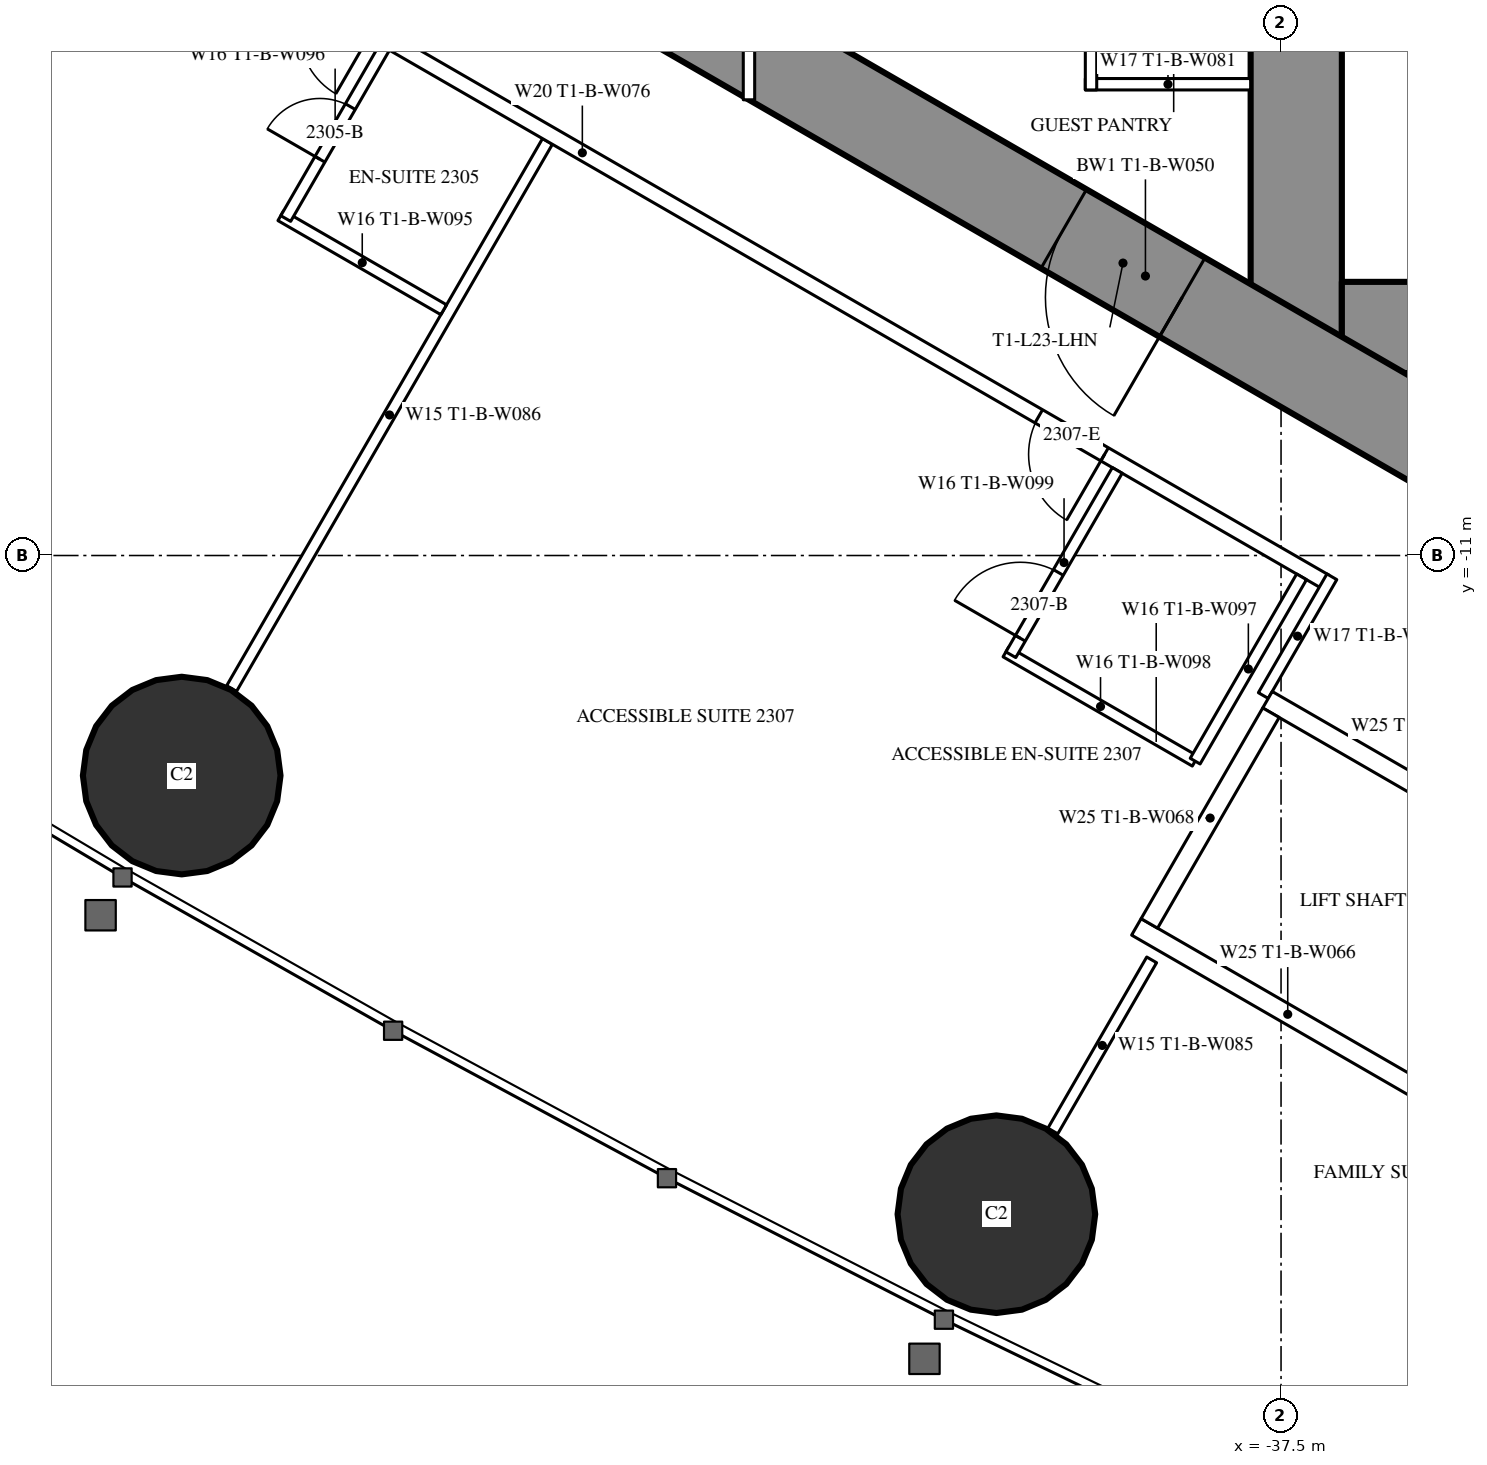
"""IFC4 building model, lengths in metres.
Left out: names, types, materials, properties, quantities, classifications, styles, units other than length and angle.
Written with IfcOpenShell. Run it as: python <this file> out.ifc"""

import sys

from ifc_helpers import new_model, si_unit, direction, frame, frame_2d, origin, origin_2d, place, context, subcontext, project, spatial, rectangle, hollow_circle, extrude, element, fill, save


model = new_model("IFC4")
c1 = context("Model", 3, precision=1e-05, world=origin(), true_north=direction((0.0, 1.0)))
c2 = subcontext(c1, "Body", "Model", "MODEL_VIEW")
j1 = project(units=[si_unit("LENGTHUNIT", "METRE"), si_unit("PLANEANGLEUNIT", "RADIAN")], contexts=[c1])
p1 = place(None, origin())
s1 = spatial("IfcSite", under=j1, at=p1, CompositionType="ELEMENT")
p2 = place(p1, origin())
s2 = spatial("IfcBuilding", under=s1, at=p2, CompositionType="ELEMENT")
p3 = place(p2, frame((0.0, 0.0, 90.6)))
s3 = spatial("IfcBuildingStorey", under=s2, at=p3, CompositionType="ELEMENT", Elevation=90.6)
for number, where, z_axis, x_axis in (
    (1, (-51.963, -13.895, 0.0), (0.0, 0.0, 1.0), (1.0, 0.0, 0.0)),
    (2, (-41.245, -19.666, 0.0), (0.0, 0.0, 1.0), (1.0, 0.0, 0.0)),
):
    element("IfcColumn", number, at=place(p3, frame(where, z_axis=z_axis, x_axis=x_axis)), inside=s3, PredefinedType="COLUMN", context=c2, shape_type="SweptSolid", body=[
        extrude(hollow_circle(Radius=1.3, WallThickness=0.1, at=origin_2d()), origin(), (0.0, 0.0, 1.0), 3.5),
    ])
p4 = place(p3, frame((-37.3, 8.6, 0.0), z_axis=(0.0, 0.0, 1.0), x_axis=(0.0, -1.0, 0.0)))
e3 = element("IfcWall", 3, at=p4, inside=s3, PredefinedType="SHEAR", context=c2, shape_type="SweptSolid", body=[
    extrude(rectangle(XDim=17.2, YDim=1.2, at=frame_2d((8.6, 0.0))), origin(), (0.0, 0.0, 1.0), 3.5),
])
p5 = place(p4, frame((7.7, 0.0, 0.0)))
e4 = element("IfcOpeningElement", 4, at=p5, cuts=e3, PredefinedType="OPENING", context=c2, shape_type="SweptSolid", body=[
    extrude(rectangle(XDim=1.8, YDim=2.2, at=frame_2d((0.9, 1.1))), frame((0.0, 0.61, 0.0), z_axis=(0.0, -1.0, 0.0), x_axis=(1.0, 0.0, 0.0)), (0.0, 0.0, 1.0), 1.22),
])
p6 = place(p3, frame((-28.3, -8.0, 0.0), z_axis=(0.0, 0.0, 1.0), x_axis=(-1.0, 0.0, 0.0)))
e5 = element("IfcWall", 5, at=p6, inside=s3, PredefinedType="SHEAR", context=c2, shape_type="SweptSolid", body=[
    extrude(rectangle(XDim=8.4, YDim=1.2, at=frame_2d((4.2, 0.0))), origin(), (0.0, 0.0, 1.0), 3.5),
])
p7 = place(p6, frame((0.25, 0.0, 0.0)))
e6 = element("IfcOpeningElement", 6, at=p7, cuts=e5, PredefinedType="OPENING", context=c2, shape_type="SweptSolid", body=[
    extrude(rectangle(XDim=1.0, YDim=2.2, at=frame_2d((0.5, 1.1))), frame((0.0, 0.61, 0.0), z_axis=(0.0, -1.0, 0.0), x_axis=(1.0, 0.0, 0.0)), (0.0, 0.0, 1.0), 1.22),
])
p8 = place(p3, frame((-27.2, -14.3, 0.0), z_axis=(0.0, 0.0, 1.0), x_axis=(-0.866024021859, 0.500002393557, 0.0)))
e7 = element("IfcWall", 7, at=p8, inside=s3, PredefinedType="SHEAR", context=c2, shape_type="SweptSolid", body=[
    extrude(rectangle(XDim=27.907, YDim=1.2, at=frame_2d((13.954, 0.0))), origin(), (0.0, 0.0, 1.0), 3.5),
])
p9 = place(p8, frame((4.6, 0.0, 0.0)))
e8 = element("IfcOpeningElement", 8, at=p9, cuts=e7, PredefinedType="OPENING", context=c2, shape_type="SweptSolid", body=[
    extrude(rectangle(XDim=1.0, YDim=2.2, at=frame_2d((0.5, 1.1))), frame((0.0, 0.61, 0.0), z_axis=(0.0, -1.0, 0.0), x_axis=(1.0, 0.0, 0.0)), (0.0, 0.0, 1.0), 1.22),
])
p10 = place(p8, frame((13.395, 0.0, 0.0)))
e9 = element("IfcOpeningElement", 9, at=p10, cuts=e7, PredefinedType="OPENING", context=c2, shape_type="SweptSolid", body=[
    extrude(rectangle(XDim=1.8, YDim=2.2, at=frame_2d((0.9, 1.1))), frame((0.0, 0.61, 0.0), z_axis=(0.0, -1.0, 0.0), x_axis=(1.0, 0.0, 0.0)), (0.0, 0.0, 1.0), 1.22),
])
p11 = place(p3, frame((-47.151, -5.552, 0.0), z_axis=(0.0, 0.0, 1.0), x_axis=(-0.500003012045, -0.866023664773, 0.0)))
e10 = element("IfcWall", 10, at=p11, inside=s3, PredefinedType="PARTITIONING", context=c2, shape_type="SweptSolid", body=[
    extrude(rectangle(XDim=8.311, YDim=0.15, at=frame_2d((4.156, 0.0))), origin(), (0.0, 0.0, 1.0), 2.2),
])
p12 = place(p3, frame((-39.202, -16.32, 0.0), z_axis=(0.0, 0.0, 1.0), x_axis=(-0.49997716683, -0.86603858612, 0.0)))
e11 = element("IfcWall", 11, at=p12, inside=s3, PredefinedType="PARTITIONING", context=c2, shape_type="SweptSolid", body=[
    extrude(rectangle(XDim=2.6, YDim=0.15, at=frame_2d((1.3, 0.0))), origin(), (0.0, 0.0, 1.0), 3.25),
])
p13 = place(p3, frame((-36.92, -11.344, 0.0), z_axis=(0.0, 0.0, 1.0), x_axis=(-0.866028313256, 0.499994960614, 0.0)))
e12 = element("IfcWall", 12, at=p13, inside=s3, PredefinedType="PARTITIONING", context=c2, shape_type="SweptSolid", body=[
    extrude(rectangle(XDim=22.568, YDim=0.2, at=frame_2d((11.284, 0.0))), origin(), (0.0, 0.0, 1.0), 3.25),
])
p14 = place(p13, frame((14.481, 0.0, 0.0)))
e13 = element("IfcOpeningElement", 13, at=p14, cuts=e12, PredefinedType="OPENING", context=c2, shape_type="SweptSolid", body=[
    extrude(rectangle(XDim=0.95, YDim=2.2, at=frame_2d((0.475, 1.1))), frame((0.0, 0.11, 0.0), z_axis=(0.0, -1.0, 0.0), x_axis=(1.0, 0.0, 0.0)), (0.0, 0.0, 1.0), 0.22),
])
p15 = place(p13, frame((3.35, 0.0, 0.0)))
e14 = element("IfcOpeningElement", 14, at=p15, cuts=e12, PredefinedType="OPENING", context=c2, shape_type="SweptSolid", body=[
    extrude(rectangle(XDim=1.0, YDim=2.2, at=frame_2d((0.5, 1.1))), frame((0.0, 0.11, 0.0), z_axis=(0.0, -1.0, 0.0), x_axis=(1.0, 0.0, 0.0)), (0.0, 0.0, 1.0), 0.22),
])
p16 = place(p3, frame((-36.831, -11.28, 0.0), z_axis=(0.0, 0.0, 1.0), x_axis=(-0.499937177781, -0.866061671171, 0.0)))
e15 = element("IfcWall", 15, at=p16, inside=s3, PredefinedType="PARTITIONING", context=c2, shape_type="SweptSolid", body=[
    extrude(rectangle(XDim=1.804, YDim=0.15, at=frame_2d((0.902, 0.0))), origin(), (0.0, 0.0, 1.0), 3.25),
])
p17 = place(p3, frame((-48.516, -7.767, 0.0), z_axis=(0.0, 0.0, 1.0), x_axis=(-0.866031185235, 0.4999899861, 0.0)))
e16 = element("IfcWall", 16, at=p17, inside=s3, PredefinedType="PARTITIONING", context=c2, shape_type="SweptSolid", body=[
    extrude(rectangle(XDim=2.475, YDim=0.15, at=frame_2d((1.238, 0.0))), origin(), (0.0, 0.0, 1.0), 3.25),
])
p18 = place(p3, frame((-49.295, -4.315, 0.0), z_axis=(0.0, 0.0, 1.0), x_axis=(-0.499936506574, -0.866062058628, 0.0)))
e17 = element("IfcWall", 17, at=p18, inside=s3, PredefinedType="PARTITIONING", context=c2, shape_type="SweptSolid", body=[
    extrude(rectangle(XDim=2.6, YDim=0.15, at=frame_2d((1.3, 0.0))), origin(), (0.0, 0.0, 1.0), 3.25),
])
p19 = place(p18, frame((0.9, 0.0, 0.0)))
e18 = element("IfcOpeningElement", 18, at=p19, cuts=e17, PredefinedType="OPENING", context=c2, shape_type="SweptSolid", body=[
    extrude(rectangle(XDim=0.8, YDim=2.2, at=frame_2d((0.4, 1.1))), frame((0.0, 0.085, 0.0), z_axis=(0.0, -1.0, 0.0), x_axis=(1.0, 0.0, 0.0)), (0.0, 0.0, 1.0), 0.17),
])
p20 = place(p3, frame((-38.63, -13.705, 0.0), z_axis=(0.0, 0.0, 1.0), x_axis=(-0.866018712932, 0.500011588718, 0.0)))
e19 = element("IfcWall", 19, at=p20, inside=s3, PredefinedType="PARTITIONING", context=c2, shape_type="SweptSolid", body=[
    extrude(rectangle(XDim=2.875, YDim=0.15, at=frame_2d((1.438, 0.0))), origin(), (0.0, 0.0, 1.0), 3.25),
])
p21 = place(p3, frame((-39.655, -9.88, 0.0), z_axis=(0.0, 0.0, 1.0), x_axis=(-0.500049511043, -0.865996816683, 0.0)))
e20 = element("IfcWall", 20, at=p21, inside=s3, PredefinedType="PARTITIONING", context=c2, shape_type="SweptSolid", body=[
    extrude(rectangle(XDim=2.8, YDim=0.15, at=frame_2d((1.4, 0.0))), origin(), (0.0, 0.0, 1.0), 3.25),
])
p22 = place(p21, frame((1.55, 0.0, 0.0)))
e21 = element("IfcOpeningElement", 21, at=p22, cuts=e20, PredefinedType="OPENING", context=c2, shape_type="SweptSolid", body=[
    extrude(rectangle(XDim=1.0, YDim=2.2, at=frame_2d((0.5, 1.1))), frame((0.0, 0.085, 0.0), z_axis=(0.0, -1.0, 0.0), x_axis=(1.0, 0.0, 0.0)), (0.0, 0.0, 1.0), 0.17),
])
p23 = place(p3, frame((-37.23, -11.281, 0.0), z_axis=(0.0, 0.0, 1.0), x_axis=(-0.500049511043, -0.865996816683, 0.0)))
e22 = element("IfcWall", 22, at=p23, inside=s3, PredefinedType="PARTITIONING", context=c2, shape_type="SweptSolid", body=[
    extrude(rectangle(XDim=2.8, YDim=0.15, at=frame_2d((1.4, 0.0))), origin(), (0.0, 0.0, 1.0), 3.25),
])
p24 = place(p3, frame((-37.9, -4.8, 0.0), z_axis=(0.0, 0.0, 1.0), x_axis=(-1.0, 0.0, 0.0)))
e23 = element("IfcWall", 23, at=p24, inside=s3, PredefinedType="PARTITIONING", context=c2, shape_type="SweptSolid", body=[
    extrude(rectangle(XDim=2.175, YDim=0.15, at=frame_2d((1.087, 0.0))), origin(), (0.0, 0.0, 1.0), 3.25),
])
p25 = place(p3, frame((-40.0, -2.525, 0.0), z_axis=(0.0, 0.0, 1.0), x_axis=(0.0, -1.0, 0.0)))
e24 = element("IfcWall", 24, at=p25, inside=s3, PredefinedType="PARTITIONING", context=c2, shape_type="SweptSolid", body=[
    extrude(rectangle(XDim=2.35, YDim=0.15, at=frame_2d((1.175, 0.0))), origin(), (0.0, 0.0, 1.0), 3.25),
])
p26 = place(p25, frame((0.675, 0.0, 0.0)))
e25 = element("IfcOpeningElement", 25, at=p26, cuts=e24, PredefinedType="OPENING", context=c2, shape_type="SweptSolid", body=[
    extrude(rectangle(XDim=1.0, YDim=2.2, at=frame_2d((0.5, 1.1))), frame((0.0, 0.085, 0.0), z_axis=(0.0, -1.0, 0.0), x_axis=(1.0, 0.0, 0.0)), (0.0, 0.0, 1.0), 0.17),
])
p27 = place(p3, frame((-44.5, 5.005, 0.0), z_axis=(0.0, 0.0, 1.0), x_axis=(0.0, -1.0, 0.0)))
e26 = element("IfcWall", 26, at=p27, inside=s3, PredefinedType="PARTITIONING", context=c2, shape_type="SweptSolid", body=[
    extrude(rectangle(XDim=10.009, YDim=0.15, at=frame_2d((5.005, 0.0))), origin(), (0.0, 0.0, 1.0), 2.45),
])
p28 = place(p27, frame((2.002, 0.0, 0.0)))
e27 = element("IfcOpeningElement", 27, at=p28, cuts=e26, PredefinedType="OPENING", context=c2, shape_type="SweptSolid", body=[
    extrude(rectangle(XDim=1.0, YDim=2.2, at=frame_2d((0.5, 1.1))), frame((0.0, 0.085, 0.0), z_axis=(0.0, -1.0, 0.0), x_axis=(1.0, 0.0, 0.0)), (0.0, 0.0, 1.0), 0.17),
])
p29 = place(p27, frame((7.007, 0.0, 0.0)))
e28 = element("IfcOpeningElement", 28, at=p29, cuts=e26, PredefinedType="OPENING", context=c2, shape_type="SweptSolid", body=[
    extrude(rectangle(XDim=1.0, YDim=2.2, at=frame_2d((0.5, 1.1))), frame((0.0, 0.085, 0.0), z_axis=(0.0, -1.0, 0.0), x_axis=(1.0, 0.0, 0.0)), (0.0, 0.0, 1.0), 0.17),
])
p30 = place(p3, frame((-33.696, -15.197, 0.0), z_axis=(0.0, 0.0, 1.0), x_axis=(-0.865976953817, 0.500083908417, 0.0)))
e29 = element("IfcWall", 29, at=p30, inside=s3, PredefinedType="PARTITIONING", context=c2, shape_type="SweptSolid", body=[
    extrude(rectangle(XDim=4.599, YDim=0.25, at=frame_2d((2.3, 0.0))), origin(), (0.0, 0.0, 1.0), 3.25),
])
p31 = place(p3, frame((-35.42, -18.186, 0.0), z_axis=(0.0, 0.0, 1.0), x_axis=(-0.865990227814, 0.50006092162, 0.0)))
e30 = element("IfcWall", 30, at=p31, inside=s3, PredefinedType="PARTITIONING", context=c2, shape_type="SweptSolid", body=[
    extrude(rectangle(XDim=4.6, YDim=0.25, at=frame_2d((2.3, 0.0))), origin(), (0.0, 0.0, 1.0), 3.25),
])
p32 = place(p3, frame((-37.633, -13.068, 0.0), z_axis=(0.0, 0.0, 1.0), x_axis=(-0.499872130319, -0.866099216793, 0.0)))
e31 = element("IfcWall", 31, at=p32, inside=s3, PredefinedType="PARTITIONING", context=c2, shape_type="SweptSolid", body=[
    extrude(rectangle(XDim=3.2, YDim=0.25, at=frame_2d((1.6, 0.0))), origin(), (0.0, 0.0, 1.0), 3.25),
])
p33 = place(p19, origin())
e32 = element("IfcDoor", 32, at=p33, inside=s3, OperationType="SINGLE_SWING_RIGHT", PredefinedType="DOOR", context=c2, shape_type="SweptSolid", body=[
    extrude(rectangle(XDim=0.8, YDim=2.2, at=frame_2d((0.4, 1.1))), frame((0.0, 0.025, 0.0), z_axis=(0.0, -1.0, 0.0), x_axis=(1.0, 0.0, 0.0)), (0.0, 0.0, 1.0), 0.05),
])
fill(e18, e32)
p34 = place(p22, origin())
e33 = element("IfcDoor", 33, at=p34, inside=s3, OperationType="SINGLE_SWING_RIGHT", PredefinedType="DOOR", context=c2, shape_type="SweptSolid", body=[
    extrude(rectangle(XDim=1.0, YDim=2.2, at=frame_2d((0.5, 1.1))), frame((0.0, 0.025, 0.0), z_axis=(0.0, -1.0, 0.0), x_axis=(1.0, 0.0, 0.0)), (0.0, 0.0, 1.0), 0.05),
])
fill(e21, e33)
p35 = place(p15, origin())
e34 = element("IfcDoor", 34, at=p35, inside=s3, OperationType="SINGLE_SWING_LEFT", PredefinedType="DOOR", context=c2, shape_type="SweptSolid", body=[
    extrude(rectangle(XDim=1.0, YDim=2.2, at=frame_2d((0.5, 1.1))), frame((0.0, 0.025, 0.0), z_axis=(0.0, -1.0, 0.0), x_axis=(1.0, 0.0, 0.0)), (0.0, 0.0, 1.0), 0.05),
])
fill(e14, e34)
p36 = place(p10, origin())
e35 = element("IfcDoor", 35, at=p36, inside=s3, OperationType="DOUBLE_DOOR_SINGLE_SWING", PredefinedType="DOOR", context=c2, shape_type="SweptSolid", body=[
    extrude(rectangle(XDim=1.8, YDim=2.2, at=frame_2d((0.9, 1.1))), frame((0.0, 0.025, 0.0), z_axis=(0.0, -1.0, 0.0), x_axis=(1.0, 0.0, 0.0)), (0.0, 0.0, 1.0), 0.05),
])
fill(e9, e35)
save(model, sys.argv[1])
